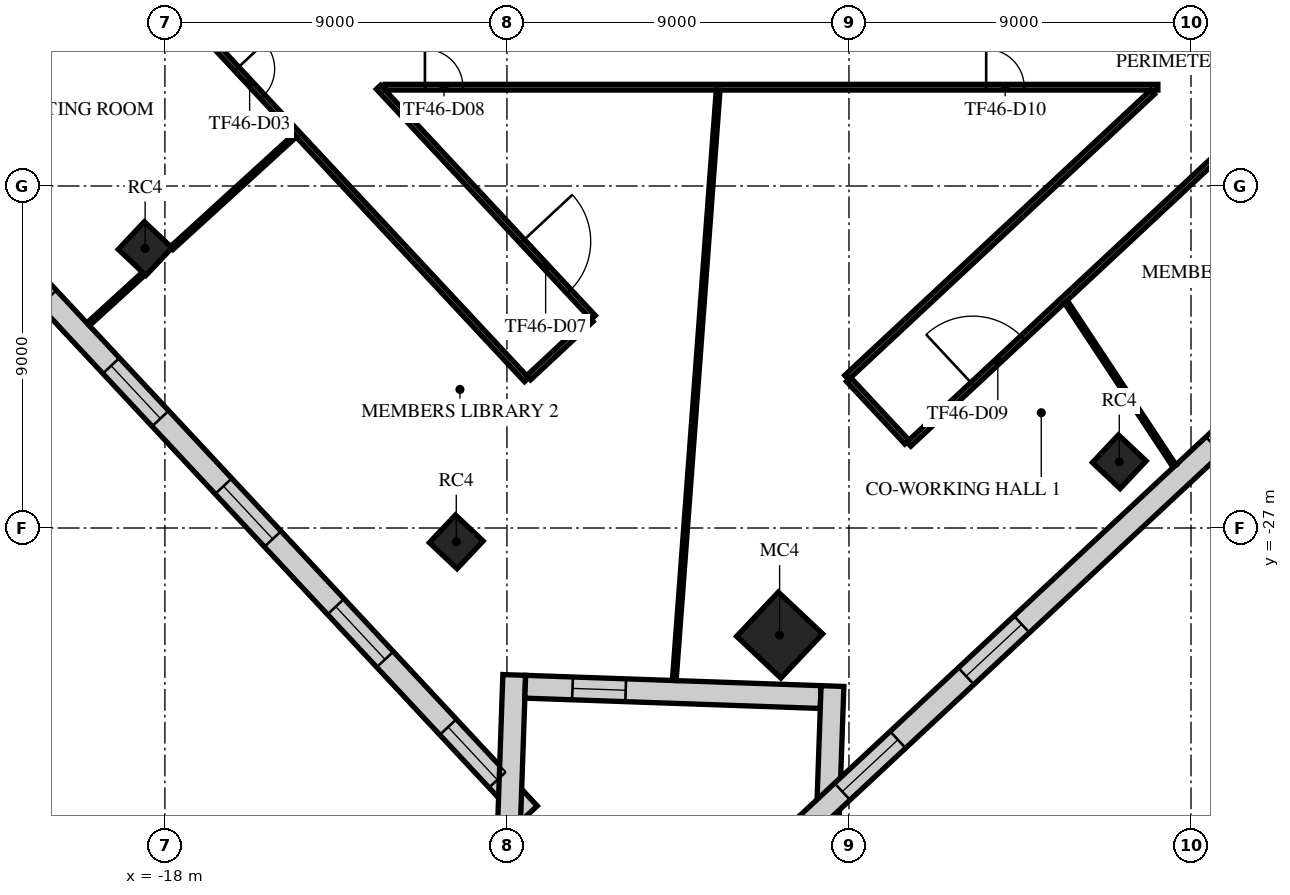
"""IFC4 building model, lengths in metres.
Left out: names, types, materials, properties, quantities, classifications, styles, units other than length and angle.
Written with IfcOpenShell. Run it as: python <this file> out.ifc"""

import sys

from ifc_helpers import new_model, si_unit, direction, frame, frame_2d, origin, origin_2d, place, context, subcontext, project, spatial, rectangle, extrude, element, fill, save


model = new_model("IFC4")
c1 = context("Model", 3, precision=1e-05, world=origin(), true_north=direction((0.0, 1.0)))
c2 = subcontext(c1, "Body", "Model", "MODEL_VIEW")
j1 = project(units=[si_unit("LENGTHUNIT", "METRE"), si_unit("PLANEANGLEUNIT", "RADIAN")], contexts=[c1])
p1 = place(None, origin())
s1 = spatial("IfcSite", under=j1, at=p1, CompositionType="ELEMENT")
p2 = place(p1, origin())
s2 = spatial("IfcBuilding", under=s1, at=p2, CompositionType="ELEMENT")
p3 = place(p2, frame((0.0, 0.0, 197.3)))
s3 = spatial("IfcBuildingStorey", under=s2, at=p3, CompositionType="ELEMENT", Elevation=197.3)
for number, where, z_axis, x_axis in (
    (1, (-18.52, -19.647, 0.0), (0.0, 0.0, 1.0), (0.686, 0.728, 0.0)),
    (2, (-10.333, -27.364, 0.0), (0.0, 0.0, 1.0), (0.686, 0.728, 0.0)),
):
    element("IfcColumn", number, at=place(p3, frame(where, z_axis=z_axis, x_axis=x_axis)), inside=s3, PredefinedType="COLUMN", context=c2, shape_type="SweptSolid", body=[
        extrude(rectangle(XDim=1.0, YDim=1.0, at=origin_2d()), origin(), (0.0, 0.0, 1.0), 4.0),
    ])
p4 = place(p3, frame((-1.825, -29.818, 0.0), z_axis=(0.0, 0.0, 1.0), x_axis=(0.685916152371, 0.727680583715, 0.0)))
e3 = element("IfcColumn", 3, at=p4, inside=s3, PredefinedType="COLUMN", context=c2, shape_type="SweptSolid", body=[
    extrude(rectangle(XDim=1.6, YDim=1.6, at=origin_2d()), origin(), (0.0, 0.0, 1.0), 4.0),
])
p5 = place(p3, frame((7.113, -25.257, 0.0), z_axis=(0.0, 0.0, 1.0), x_axis=(0.685916152371, 0.727680583715, 0.0)))
e4 = element("IfcColumn", 4, at=p5, inside=s3, PredefinedType="COLUMN", context=c2, shape_type="SweptSolid", body=[
    extrude(rectangle(XDim=1.0, YDim=1.0, at=origin_2d()), origin(), (0.0, 0.0, 1.0), 4.0),
])
p6 = place(p3, frame((-35.02, -5.994, 0.0), z_axis=(0.0, 0.0, 1.0), x_axis=(0.682002361324, -0.731349970362, 0.0)))
e5 = element("IfcWall", 5, at=p6, inside=s3, PredefinedType="STANDARD", context=c2, shape_type="SweptSolid", body=[
    extrude(rectangle(XDim=39.0, YDim=0.6, at=frame_2d((19.5, 0.0))), origin(), (0.0, 0.0, 1.0), 3.62),
])
p7 = place(p6, frame((1.217, 0.0, 0.9)))
e6 = element("IfcOpeningElement", 6, at=p7, cuts=e5, PredefinedType="OPENING", context=c2, shape_type="SweptSolid", body=[
    extrude(rectangle(XDim=1.9, YDim=2.1, at=frame_2d((0.95, 1.05))), frame((0.0, 0.31, 0.0), z_axis=(0.0, -1.0, 0.0), x_axis=(1.0, 0.0, 0.0)), (0.0, 0.0, 1.0), 0.62),
])
p8 = place(p6, frame((5.55, 0.0, 0.9)))
e7 = element("IfcOpeningElement", 7, at=p8, cuts=e5, PredefinedType="OPENING", context=c2, shape_type="SweptSolid", body=[
    extrude(rectangle(XDim=1.9, YDim=2.1, at=frame_2d((0.95, 1.05))), frame((0.0, 0.31, 0.0), z_axis=(0.0, -1.0, 0.0), x_axis=(1.0, 0.0, 0.0)), (0.0, 0.0, 1.0), 0.62),
])
p9 = place(p6, frame((9.883, 0.0, 0.9)))
e8 = element("IfcOpeningElement", 8, at=p9, cuts=e5, PredefinedType="OPENING", context=c2, shape_type="SweptSolid", body=[
    extrude(rectangle(XDim=1.9, YDim=2.1, at=frame_2d((0.95, 1.05))), frame((0.0, 0.31, 0.0), z_axis=(0.0, -1.0, 0.0), x_axis=(1.0, 0.0, 0.0)), (0.0, 0.0, 1.0), 0.62),
])
p10 = place(p6, frame((14.217, 0.0, 0.9)))
e9 = element("IfcOpeningElement", 9, at=p10, cuts=e5, PredefinedType="OPENING", context=c2, shape_type="SweptSolid", body=[
    extrude(rectangle(XDim=1.9, YDim=2.1, at=frame_2d((0.95, 1.05))), frame((0.0, 0.31, 0.0), z_axis=(0.0, -1.0, 0.0), x_axis=(1.0, 0.0, 0.0)), (0.0, 0.0, 1.0), 0.62),
])
p11 = place(p6, frame((18.55, 0.0, 0.9)))
e10 = element("IfcOpeningElement", 10, at=p11, cuts=e5, PredefinedType="OPENING", context=c2, shape_type="SweptSolid", body=[
    extrude(rectangle(XDim=1.9, YDim=2.1, at=frame_2d((0.95, 1.05))), frame((0.0, 0.31, 0.0), z_axis=(0.0, -1.0, 0.0), x_axis=(1.0, 0.0, 0.0)), (0.0, 0.0, 1.0), 0.62),
])
p12 = place(p6, frame((22.883, 0.0, 0.9)))
e11 = element("IfcOpeningElement", 11, at=p12, cuts=e5, PredefinedType="OPENING", context=c2, shape_type="SweptSolid", body=[
    extrude(rectangle(XDim=1.9, YDim=2.1, at=frame_2d((0.95, 1.05))), frame((0.0, 0.31, 0.0), z_axis=(0.0, -1.0, 0.0), x_axis=(1.0, 0.0, 0.0)), (0.0, 0.0, 1.0), 0.62),
])
p13 = place(p6, frame((27.217, 0.0, 0.9)))
e12 = element("IfcOpeningElement", 12, at=p13, cuts=e5, PredefinedType="OPENING", context=c2, shape_type="SweptSolid", body=[
    extrude(rectangle(XDim=1.9, YDim=2.1, at=frame_2d((0.95, 1.05))), frame((0.0, 0.31, 0.0), z_axis=(0.0, -1.0, 0.0), x_axis=(1.0, 0.0, 0.0)), (0.0, 0.0, 1.0), 0.62),
])
p14 = place(p6, frame((31.55, 0.0, 0.9)))
e13 = element("IfcOpeningElement", 13, at=p14, cuts=e5, PredefinedType="OPENING", context=c2, shape_type="SweptSolid", body=[
    extrude(rectangle(XDim=1.9, YDim=2.1, at=frame_2d((0.95, 1.05))), frame((0.0, 0.31, 0.0), z_axis=(0.0, -1.0, 0.0), x_axis=(1.0, 0.0, 0.0)), (0.0, 0.0, 1.0), 0.62),
])
p15 = place(p6, frame((35.883, 0.0, 0.9)))
e14 = element("IfcOpeningElement", 14, at=p15, cuts=e5, PredefinedType="OPENING", context=c2, shape_type="SweptSolid", body=[
    extrude(rectangle(XDim=1.9, YDim=2.1, at=frame_2d((0.95, 1.05))), frame((0.0, 0.31, 0.0), z_axis=(0.0, -1.0, 0.0), x_axis=(1.0, 0.0, 0.0)), (0.0, 0.0, 1.0), 0.62),
])
p16 = place(p3, frame((-8.941, -34.711, 0.0), z_axis=(0.0, 0.0, 1.0), x_axis=(0.034908217157, 0.999390522456, 0.0)))
e15 = element("IfcWall", 15, at=p16, inside=s3, PredefinedType="STANDARD", context=c2, shape_type="SweptSolid", body=[
    extrude(rectangle(XDim=3.847, YDim=0.6, at=frame_2d((1.923, 0.0))), origin(), (0.0, 0.0, 1.0), 3.62),
])
p17 = place(p3, frame((-8.518, -31.177, 0.0), z_axis=(0.0, 0.0, 1.0), x_axis=(0.999390692686, -0.034903343287, 0.0)))
e16 = element("IfcWall", 16, at=p17, inside=s3, PredefinedType="STANDARD", context=c2, shape_type="SweptSolid", body=[
    extrude(rectangle(XDim=7.778, YDim=0.6, at=frame_2d((3.889, 0.0))), origin(), (0.0, 0.0, 1.0), 3.62),
])
p18 = place(p17, frame((1.244, 0.0, 0.9)))
e17 = element("IfcOpeningElement", 17, at=p18, cuts=e16, PredefinedType="OPENING", context=c2, shape_type="SweptSolid", body=[
    extrude(rectangle(XDim=1.4, YDim=2.1, at=frame_2d((0.7, 1.05))), frame((0.0, 0.31, 0.0), z_axis=(0.0, -1.0, 0.0), x_axis=(1.0, 0.0, 0.0)), (0.0, 0.0, 1.0), 0.62),
])
p19 = place(p3, frame((-0.434, -31.159, 0.0), z_axis=(0.0, 0.0, 1.0), x_axis=(-0.034908217157, -0.999390522456, 0.0)))
e18 = element("IfcWall", 18, at=p19, inside=s3, PredefinedType="STANDARD", context=c2, shape_type="SweptSolid", body=[
    extrude(rectangle(XDim=3.847, YDim=0.6, at=frame_2d((1.923, 0.0))), origin(), (0.0, 0.0, 1.0), 3.62),
])
p20 = place(p3, frame((-1.073, -34.773, 0.0), z_axis=(0.0, 0.0, 1.0), x_axis=(0.731351780381, 0.682000420333, 0.0)))
e19 = element("IfcWall", 19, at=p20, inside=s3, PredefinedType="STANDARD", context=c2, shape_type="SweptSolid", body=[
    extrude(rectangle(XDim=49.0, YDim=0.6, at=frame_2d((24.5, 0.0))), origin(), (0.0, 0.0, 1.0), 3.62),
])
p21 = place(p20, frame((1.227, 0.0, 0.9)))
e20 = element("IfcOpeningElement", 20, at=p21, cuts=e19, PredefinedType="OPENING", context=c2, shape_type="SweptSolid", body=[
    extrude(rectangle(XDim=2.0, YDim=2.1, at=frame_2d((1.0, 1.05))), frame((0.0, 0.31, 0.0), z_axis=(0.0, -1.0, 0.0), x_axis=(1.0, 0.0, 0.0)), (0.0, 0.0, 1.0), 0.62),
])
p22 = place(p20, frame((5.682, 0.0, 0.9)))
e21 = element("IfcOpeningElement", 21, at=p22, cuts=e19, PredefinedType="OPENING", context=c2, shape_type="SweptSolid", body=[
    extrude(rectangle(XDim=2.0, YDim=2.1, at=frame_2d((1.0, 1.05))), frame((0.0, 0.31, 0.0), z_axis=(0.0, -1.0, 0.0), x_axis=(1.0, 0.0, 0.0)), (0.0, 0.0, 1.0), 0.62),
])
p23 = place(p20, frame((14.591, 0.0, 0.9)))
e22 = element("IfcOpeningElement", 22, at=p23, cuts=e19, PredefinedType="OPENING", context=c2, shape_type="SweptSolid", body=[
    extrude(rectangle(XDim=2.0, YDim=2.1, at=frame_2d((1.0, 1.05))), frame((0.0, 0.31, 0.0), z_axis=(0.0, -1.0, 0.0), x_axis=(1.0, 0.0, 0.0)), (0.0, 0.0, 1.0), 0.62),
])
p24 = place(p20, frame((19.045, 0.0, 0.9)))
e23 = element("IfcOpeningElement", 23, at=p24, cuts=e19, PredefinedType="OPENING", context=c2, shape_type="SweptSolid", body=[
    extrude(rectangle(XDim=2.0, YDim=2.1, at=frame_2d((1.0, 1.05))), frame((0.0, 0.31, 0.0), z_axis=(0.0, -1.0, 0.0), x_axis=(1.0, 0.0, 0.0)), (0.0, 0.0, 1.0), 0.62),
])
p25 = place(p20, frame((23.5, 0.0, 0.9)))
e24 = element("IfcOpeningElement", 24, at=p25, cuts=e19, PredefinedType="OPENING", context=c2, shape_type="SweptSolid", body=[
    extrude(rectangle(XDim=2.0, YDim=2.1, at=frame_2d((1.0, 1.05))), frame((0.0, 0.31, 0.0), z_axis=(0.0, -1.0, 0.0), x_axis=(1.0, 0.0, 0.0)), (0.0, 0.0, 1.0), 0.62),
])
p26 = place(p20, frame((27.955, 0.0, 0.9)))
e25 = element("IfcOpeningElement", 25, at=p26, cuts=e19, PredefinedType="OPENING", context=c2, shape_type="SweptSolid", body=[
    extrude(rectangle(XDim=2.0, YDim=2.1, at=frame_2d((1.0, 1.05))), frame((0.0, 0.31, 0.0), z_axis=(0.0, -1.0, 0.0), x_axis=(1.0, 0.0, 0.0)), (0.0, 0.0, 1.0), 0.62),
])
p27 = place(p20, frame((32.409, 0.0, 0.9)))
e26 = element("IfcOpeningElement", 26, at=p27, cuts=e19, PredefinedType="OPENING", context=c2, shape_type="SweptSolid", body=[
    extrude(rectangle(XDim=2.0, YDim=2.1, at=frame_2d((1.0, 1.05))), frame((0.0, 0.31, 0.0), z_axis=(0.0, -1.0, 0.0), x_axis=(1.0, 0.0, 0.0)), (0.0, 0.0, 1.0), 0.62),
])
p28 = place(p20, frame((36.864, 0.0, 0.9)))
e27 = element("IfcOpeningElement", 27, at=p28, cuts=e19, PredefinedType="OPENING", context=c2, shape_type="SweptSolid", body=[
    extrude(rectangle(XDim=2.0, YDim=2.1, at=frame_2d((1.0, 1.05))), frame((0.0, 0.31, 0.0), z_axis=(0.0, -1.0, 0.0), x_axis=(1.0, 0.0, 0.0)), (0.0, 0.0, 1.0), 0.62),
])
p29 = place(p20, frame((41.318, 0.0, 0.9)))
e28 = element("IfcOpeningElement", 28, at=p29, cuts=e19, PredefinedType="OPENING", context=c2, shape_type="SweptSolid", body=[
    extrude(rectangle(XDim=2.0, YDim=2.1, at=frame_2d((1.0, 1.05))), frame((0.0, 0.31, 0.0), z_axis=(0.0, -1.0, 0.0), x_axis=(1.0, 0.0, 0.0)), (0.0, 0.0, 1.0), 0.62),
])
p30 = place(p20, frame((45.773, 0.0, 0.9)))
e29 = element("IfcOpeningElement", 29, at=p30, cuts=e19, PredefinedType="OPENING", context=c2, shape_type="SweptSolid", body=[
    extrude(rectangle(XDim=2.0, YDim=2.1, at=frame_2d((1.0, 1.05))), frame((0.0, 0.31, 0.0), z_axis=(0.0, -1.0, 0.0), x_axis=(1.0, 0.0, 0.0)), (0.0, 0.0, 1.0), 0.62),
])
p31 = place(p3, frame((-23.582, -6.907, 0.0), z_axis=(0.0, 0.0, 1.0), x_axis=(0.68201130552, -0.73134162957, 0.0)))
e30 = element("IfcWall", 30, at=p31, inside=s3, PredefinedType="PARTITIONING", context=c2, shape_type="SweptSolid", body=[
    extrude(rectangle(XDim=22.137, YDim=0.15, at=frame_2d((11.069, 0.0))), origin(), (0.0, 0.0, 1.0), 3.17),
])
p32 = place(p31, frame((10.953, 0.0, 0.0)))
e31 = element("IfcOpeningElement", 31, at=p32, cuts=e30, PredefinedType="OPENING", context=c2, shape_type="SweptSolid", body=[
    extrude(rectangle(XDim=1.0, YDim=2.1, at=frame_2d((0.5, 1.05))), frame((0.0, 0.085, 0.0), z_axis=(0.0, -1.0, 0.0), x_axis=(1.0, 0.0, 0.0)), (0.0, 0.0, 1.0), 0.17),
])
p33 = place(p3, frame((-12.38, -15.4, 0.0), z_axis=(0.0, 0.0, 1.0), x_axis=(0.681925559665, -0.731421582314, 0.0)))
e32 = element("IfcWall", 32, at=p33, inside=s3, PredefinedType="PARTITIONING", context=c2, shape_type="SweptSolid", body=[
    extrude(rectangle(XDim=8.287, YDim=0.15, at=frame_2d((4.143, 0.0))), origin(), (0.0, 0.0, 1.0), 3.17),
])
p34 = place(p33, frame((5.55, 0.0, 0.0)))
e33 = element("IfcOpeningElement", 33, at=p34, cuts=e32, PredefinedType="OPENING", context=c2, shape_type="SweptSolid", body=[
    extrude(rectangle(XDim=1.8, YDim=2.1, at=frame_2d((0.9, 1.05))), frame((0.0, 0.085, 0.0), z_axis=(0.0, -1.0, 0.0), x_axis=(1.0, 0.0, 0.0)), (0.0, 0.0, 1.0), 0.17),
])
p35 = place(p3, frame((-12.208, -15.4, 0.0), z_axis=(0.0, 0.0, 1.0), x_axis=(1.0, 0.0, 0.0)))
e34 = element("IfcWall", 34, at=p35, inside=s3, PredefinedType="PARTITIONING", context=c2, shape_type="SweptSolid", body=[
    extrude(rectangle(XDim=20.336, YDim=0.15, at=frame_2d((10.168, 0.0))), origin(), (0.0, 0.0, 1.0), 3.17),
])
p36 = place(p35, frame((1.05, 0.0, 0.0)))
e35 = element("IfcOpeningElement", 35, at=p36, cuts=e34, PredefinedType="OPENING", context=c2, shape_type="SweptSolid", body=[
    extrude(rectangle(XDim=1.0, YDim=2.1, at=frame_2d((0.5, 1.05))), frame((0.0, 0.085, 0.0), z_axis=(0.0, -1.0, 0.0), x_axis=(1.0, 0.0, 0.0)), (0.0, 0.0, 1.0), 0.17),
])
p37 = place(p35, frame((15.818, 0.0, 0.0)))
e36 = element("IfcOpeningElement", 36, at=p37, cuts=e34, PredefinedType="OPENING", context=c2, shape_type="SweptSolid", body=[
    extrude(rectangle(XDim=1.0, YDim=2.1, at=frame_2d((0.5, 1.05))), frame((0.0, 0.085, 0.0), z_axis=(0.0, -1.0, 0.0), x_axis=(1.0, 0.0, 0.0)), (0.0, 0.0, 1.0), 0.17),
])
p38 = place(p3, frame((-8.429, -23.046, 0.0), z_axis=(0.0, 0.0, 1.0), x_axis=(0.731473834751, 0.681869510299, 0.0)))
e37 = element("IfcWall", 37, at=p38, inside=s3, PredefinedType="PARTITIONING", context=c2, shape_type="SweptSolid", body=[
    extrude(rectangle(XDim=2.249, YDim=0.15, at=frame_2d((1.125, 0.0))), origin(), (0.0, 0.0, 1.0), 3.62),
])
p39 = place(p3, frame((-0.061, -23.038, 0.0), z_axis=(0.0, 0.0, 1.0), x_axis=(0.731316284431, 0.682038482878, 0.0)))
e38 = element("IfcWall", 38, at=p39, inside=s3, PredefinedType="PARTITIONING", context=c2, shape_type="SweptSolid", body=[
    extrude(rectangle(XDim=11.009, YDim=0.15, at=frame_2d((5.504, 0.0))), origin(), (0.0, 0.0, 1.0), 3.17),
])
p40 = place(p3, frame((-0.01, -23.093, 0.0), z_axis=(0.0, 0.0, 1.0), x_axis=(0.682101713431, -0.731257309388, 0.0)))
e39 = element("IfcWall", 39, at=p40, inside=s3, PredefinedType="PARTITIONING", context=c2, shape_type="SweptSolid", body=[
    extrude(rectangle(XDim=2.25, YDim=0.15, at=frame_2d((1.125, 0.0))), origin(), (0.0, 0.0, 1.0), 3.62),
])
p41 = place(p3, frame((1.576, -24.793, 0.0), z_axis=(0.0, 0.0, 1.0), x_axis=(0.731351215564, 0.68200102602, 0.0)))
e40 = element("IfcWall", 40, at=p41, inside=s3, PredefinedType="PARTITIONING", context=c2, shape_type="SweptSolid", body=[
    extrude(rectangle(XDim=31.513, YDim=0.15, at=frame_2d((15.757, 0.0))), origin(), (0.0, 0.0, 1.0), 3.17),
])
p42 = place(p41, frame((2.3, 0.0, 0.0)))
e41 = element("IfcOpeningElement", 41, at=p42, cuts=e40, PredefinedType="OPENING", context=c2, shape_type="SweptSolid", body=[
    extrude(rectangle(XDim=1.8, YDim=2.1, at=frame_2d((0.9, 1.05))), frame((0.0, 0.085, 0.0), z_axis=(0.0, -1.0, 0.0), x_axis=(1.0, 0.0, 0.0)), (0.0, 0.0, 1.0), 0.17),
])
p43 = place(p41, frame((11.883, 0.0, 0.0)))
e42 = element("IfcOpeningElement", 42, at=p43, cuts=e40, PredefinedType="OPENING", context=c2, shape_type="SweptSolid", body=[
    extrude(rectangle(XDim=1.0, YDim=2.1, at=frame_2d((0.5, 1.05))), frame((0.0, 0.085, 0.0), z_axis=(0.0, -1.0, 0.0), x_axis=(1.0, 0.0, 0.0)), (0.0, 0.0, 1.0), 0.17),
])
p44 = place(p41, frame((15.726, 0.0, 0.0)))
e43 = element("IfcOpeningElement", 43, at=p44, cuts=e40, PredefinedType="OPENING", context=c2, shape_type="SweptSolid", body=[
    extrude(rectangle(XDim=1.0, YDim=2.1, at=frame_2d((0.5, 1.05))), frame((0.0, 0.085, 0.0), z_axis=(0.0, -1.0, 0.0), x_axis=(1.0, 0.0, 0.0)), (0.0, 0.0, 1.0), 0.17),
])
p45 = place(p3, frame((-25.927, -15.302, 0.0), z_axis=(0.0, 0.0, 1.0), x_axis=(0.741648836196, 0.670788344986, 0.0)))
e44 = element("IfcWall", 44, at=p45, inside=s3, PredefinedType="PARTITIONING", context=c2, shape_type="SweptSolid", body=[
    extrude(rectangle(XDim=7.366, YDim=0.1, at=frame_2d((3.683, 0.0))), origin(), (0.0, 0.0, 1.0), 2.97),
])
p46 = place(p3, frame((-20.018, -21.638, 0.0), z_axis=(0.0, 0.0, 1.0), x_axis=(0.738813357268, 0.673910100178, 0.0)))
e45 = element("IfcWall", 45, at=p46, inside=s3, PredefinedType="PARTITIONING", context=c2, shape_type="SweptSolid", body=[
    extrude(rectangle(XDim=1.982, YDim=0.1, at=frame_2d((0.991, 0.0))), origin(), (0.0, 0.0, 1.0), 3.62),
])
p47 = place(p3, frame((-17.819, -19.632, 0.0), z_axis=(0.0, 0.0, 1.0), x_axis=(0.738796153114, 0.673928960755, 0.0)))
e46 = element("IfcWall", 46, at=p47, inside=s3, PredefinedType="PARTITIONING", context=c2, shape_type="SweptSolid", body=[
    extrude(rectangle(XDim=4.388, YDim=0.1, at=frame_2d((2.194, 0.0))), origin(), (0.0, 0.0, 1.0), 3.05),
])
p48 = place(p3, frame((-4.597, -31.012, 0.0), z_axis=(0.0, 0.0, 1.0), x_axis=(0.074186343443, 0.997244396548, 0.0)))
e47 = element("IfcWall", 47, at=p48, inside=s3, PredefinedType="PARTITIONING", context=c2, shape_type="SweptSolid", body=[
    extrude(rectangle(XDim=15.576, YDim=0.1, at=frame_2d((7.788, 0.0))), origin(), (0.0, 0.0, 1.0), 2.97),
])
p49 = place(p3, frame((5.711, -21.052, 0.0), z_axis=(0.0, 0.0, 1.0), x_axis=(0.55163930412, -0.834082776557, 0.0)))
e48 = element("IfcWall", 48, at=p49, inside=s3, PredefinedType="PARTITIONING", context=c2, shape_type="SweptSolid", body=[
    extrude(rectangle(XDim=5.178, YDim=0.1, at=frame_2d((2.589, 0.0))), origin(), (0.0, 0.0, 1.0), 2.97),
])
p50 = place(p12, origin())
e49 = element("IfcWindow", 49, at=p50, inside=s3, PartitioningType="SINGLE_PANEL", PredefinedType="WINDOW", context=c2, shape_type="SweptSolid", body=[
    extrude(rectangle(XDim=1.9, YDim=2.1, at=frame_2d((0.95, 1.05))), frame((0.0, 0.03, 0.0), z_axis=(0.0, -1.0, 0.0), x_axis=(1.0, 0.0, 0.0)), (0.0, 0.0, 1.0), 0.06),
])
fill(e11, e49)
p51 = place(p13, origin())
e50 = element("IfcWindow", 50, at=p51, inside=s3, PartitioningType="SINGLE_PANEL", PredefinedType="WINDOW", context=c2, shape_type="SweptSolid", body=[
    extrude(rectangle(XDim=1.9, YDim=2.1, at=frame_2d((0.95, 1.05))), frame((0.0, 0.03, 0.0), z_axis=(0.0, -1.0, 0.0), x_axis=(1.0, 0.0, 0.0)), (0.0, 0.0, 1.0), 0.06),
])
fill(e12, e50)
p52 = place(p14, origin())
e51 = element("IfcWindow", 51, at=p52, inside=s3, PartitioningType="SINGLE_PANEL", PredefinedType="WINDOW", context=c2, shape_type="SweptSolid", body=[
    extrude(rectangle(XDim=1.9, YDim=2.1, at=frame_2d((0.95, 1.05))), frame((0.0, 0.03, 0.0), z_axis=(0.0, -1.0, 0.0), x_axis=(1.0, 0.0, 0.0)), (0.0, 0.0, 1.0), 0.06),
])
fill(e13, e51)
p53 = place(p15, origin())
e52 = element("IfcWindow", 52, at=p53, inside=s3, PartitioningType="SINGLE_PANEL", PredefinedType="WINDOW", context=c2, shape_type="SweptSolid", body=[
    extrude(rectangle(XDim=1.9, YDim=2.1, at=frame_2d((0.95, 1.05))), frame((0.0, 0.03, 0.0), z_axis=(0.0, -1.0, 0.0), x_axis=(1.0, 0.0, 0.0)), (0.0, 0.0, 1.0), 0.06),
])
fill(e14, e52)
p54 = place(p18, origin())
e53 = element("IfcWindow", 53, at=p54, inside=s3, PartitioningType="SINGLE_PANEL", PredefinedType="WINDOW", context=c2, shape_type="SweptSolid", body=[
    extrude(rectangle(XDim=1.4, YDim=2.1, at=frame_2d((0.7, 1.05))), frame((0.0, 0.03, 0.0), z_axis=(0.0, -1.0, 0.0), x_axis=(1.0, 0.0, 0.0)), (0.0, 0.0, 1.0), 0.06),
])
fill(e17, e53)
p55 = place(p21, origin())
e54 = element("IfcWindow", 54, at=p55, inside=s3, PartitioningType="SINGLE_PANEL", PredefinedType="WINDOW", context=c2, shape_type="SweptSolid", body=[
    extrude(rectangle(XDim=2.0, YDim=2.1, at=frame_2d((1.0, 1.05))), frame((0.0, 0.03, 0.0), z_axis=(0.0, -1.0, 0.0), x_axis=(1.0, 0.0, 0.0)), (0.0, 0.0, 1.0), 0.06),
])
fill(e20, e54)
p56 = place(p22, origin())
e55 = element("IfcWindow", 55, at=p56, inside=s3, PartitioningType="SINGLE_PANEL", PredefinedType="WINDOW", context=c2, shape_type="SweptSolid", body=[
    extrude(rectangle(XDim=2.0, YDim=2.1, at=frame_2d((1.0, 1.05))), frame((0.0, 0.03, 0.0), z_axis=(0.0, -1.0, 0.0), x_axis=(1.0, 0.0, 0.0)), (0.0, 0.0, 1.0), 0.06),
])
fill(e21, e55)
p57 = place(p32, frame((1.0, 0.0, 0.0), z_axis=(0.0, 0.0, 1.0), x_axis=(-1.0, 0.0, 0.0)))
e56 = element("IfcDoor", 56, at=p57, inside=s3, OperationType="SINGLE_SWING_RIGHT", PredefinedType="DOOR", context=c2, shape_type="SweptSolid", body=[
    extrude(rectangle(XDim=1.0, YDim=2.1, at=frame_2d((0.5, 1.05))), frame((0.0, 0.025, 0.0), z_axis=(0.0, -1.0, 0.0), x_axis=(1.0, 0.0, 0.0)), (0.0, 0.0, 1.0), 0.05),
])
fill(e31, e56)
p58 = place(p34, origin())
e57 = element("IfcDoor", 57, at=p58, inside=s3, OperationType="DOUBLE_DOOR_SINGLE_SWING", PredefinedType="DOOR", context=c2, shape_type="SweptSolid", body=[
    extrude(rectangle(XDim=1.8, YDim=2.1, at=frame_2d((0.9, 1.05))), frame((0.0, 0.025, 0.0), z_axis=(0.0, -1.0, 0.0), x_axis=(1.0, 0.0, 0.0)), (0.0, 0.0, 1.0), 0.05),
])
fill(e33, e57)
p59 = place(p36, frame((1.0, 0.0, 0.0), z_axis=(0.0, 0.0, 1.0), x_axis=(-1.0, 0.0, 0.0)))
e58 = element("IfcDoor", 58, at=p59, inside=s3, OperationType="SINGLE_SWING_RIGHT", PredefinedType="DOOR", context=c2, shape_type="SweptSolid", body=[
    extrude(rectangle(XDim=1.0, YDim=2.1, at=frame_2d((0.5, 1.05))), frame((0.0, 0.025, 0.0), z_axis=(0.0, -1.0, 0.0), x_axis=(1.0, 0.0, 0.0)), (0.0, 0.0, 1.0), 0.05),
])
fill(e35, e58)
p60 = place(p42, frame((1.8, 0.0, 0.0), z_axis=(0.0, 0.0, 1.0), x_axis=(-1.0, 0.0, 0.0)))
e59 = element("IfcDoor", 59, at=p60, inside=s3, OperationType="DOUBLE_DOOR_SINGLE_SWING", PredefinedType="DOOR", context=c2, shape_type="SweptSolid", body=[
    extrude(rectangle(XDim=1.8, YDim=2.1, at=frame_2d((0.9, 1.05))), frame((0.0, 0.025, 0.0), z_axis=(0.0, -1.0, 0.0), x_axis=(1.0, 0.0, 0.0)), (0.0, 0.0, 1.0), 0.05),
])
fill(e41, e59)
p61 = place(p37, frame((1.0, 0.0, 0.0), z_axis=(0.0, 0.0, 1.0), x_axis=(-1.0, 0.0, 0.0)))
e60 = element("IfcDoor", 60, at=p61, inside=s3, OperationType="SINGLE_SWING_LEFT", PredefinedType="DOOR", context=c2, shape_type="SweptSolid", body=[
    extrude(rectangle(XDim=1.0, YDim=2.1, at=frame_2d((0.5, 1.05))), frame((0.0, 0.025, 0.0), z_axis=(0.0, -1.0, 0.0), x_axis=(1.0, 0.0, 0.0)), (0.0, 0.0, 1.0), 0.05),
])
fill(e36, e60)
save(model, sys.argv[1])
